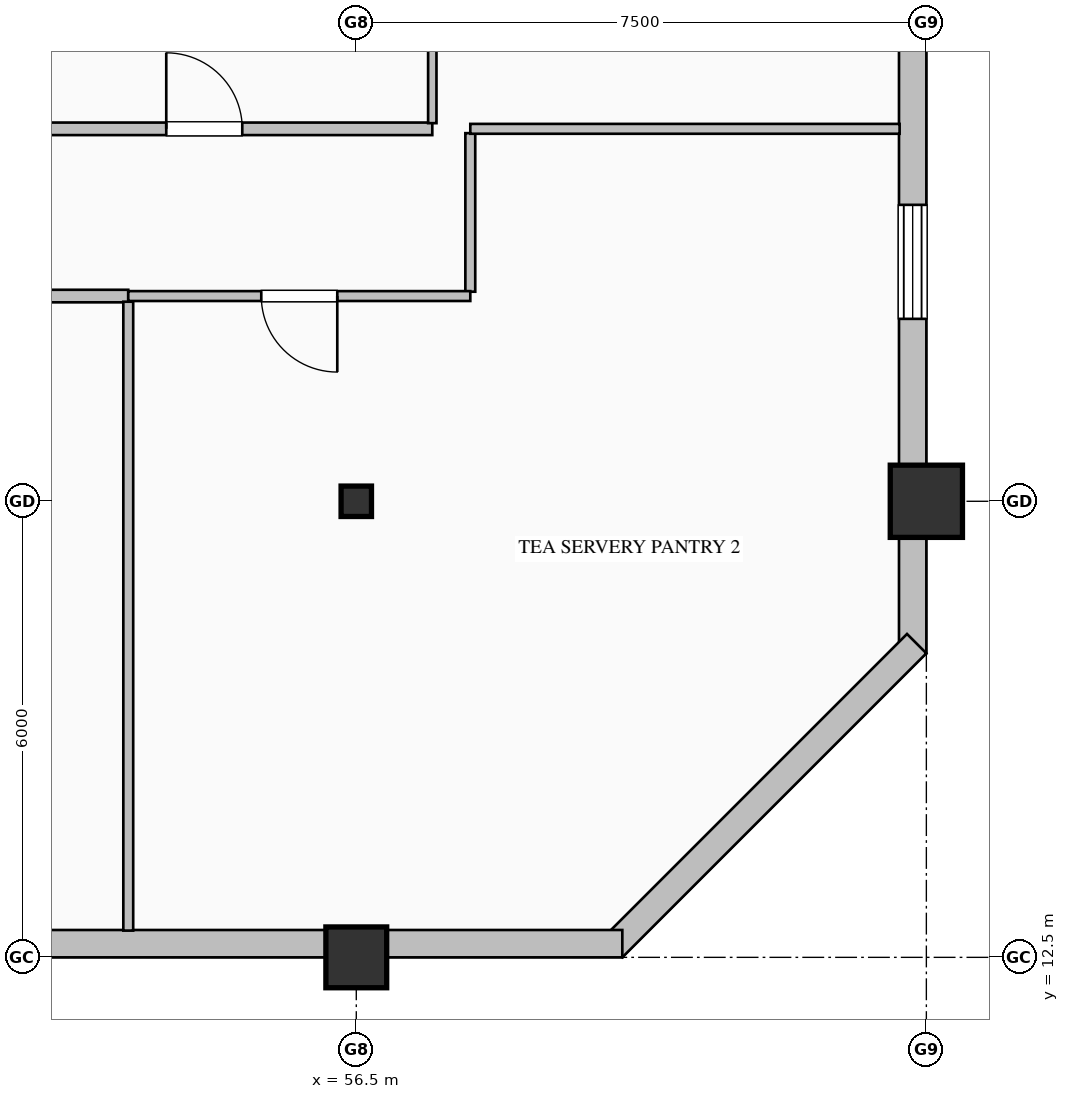
"""IFC4 building model, lengths in metres.
Left out: names, types, materials, properties, quantities, classifications, styles, units other than length and angle.
Written with IfcOpenShell. Run it as: python <this file> out.ifc"""

import sys

from ifc_helpers import new_model, si_unit, direction, frame, frame_2d, origin, origin_2d, place, context, subcontext, project, spatial, rectangle, hollow_rectangle, i_section, extrude, element, fill, save


model = new_model("IFC4")
c1 = context("Model", 3, precision=1e-05, world=origin(), true_north=direction((0.0, 1.0)))
c2 = subcontext(c1, "Body", "Model", "MODEL_VIEW")
j1 = project(units=[si_unit("LENGTHUNIT", "METRE"), si_unit("PLANEANGLEUNIT", "RADIAN")], contexts=[c1])
p1 = place(None, origin())
s1 = spatial("IfcSite", under=j1, at=p1, CompositionType="ELEMENT")
p2 = place(p1, origin())
s2 = spatial("IfcBuilding", under=s1, at=p2, CompositionType="ELEMENT")
p3 = place(p2, frame((0.0, 0.0, 245.8)))
s3 = spatial("IfcBuildingStorey", under=s2, at=p3, CompositionType="ELEMENT", Elevation=245.8)
p4 = place(p3, frame((56.5, 12.5, 0.0), z_axis=(0.0, 0.0, 1.0), x_axis=(1.0, 0.0, 0.0)))
e1 = element("IfcColumn", 1, at=p4, inside=s3, PredefinedType="COLUMN", context=c2, shape_type="SweptSolid", body=[
    extrude(hollow_rectangle(XDim=0.8, YDim=0.8, WallThickness=0.032, at=origin_2d()), origin(), (0.0, 0.0, 1.0), 4.0),
])
p5 = place(p3, frame((56.5, 18.5, 0.0), z_axis=(0.0, 0.0, 1.0), x_axis=(1.0, 0.0, 0.0)))
e2 = element("IfcColumn", 2, at=p5, inside=s3, PredefinedType="COLUMN", context=c2, shape_type="SweptSolid", body=[
    extrude(i_section(OverallWidth=0.4, OverallDepth=0.4, WebThickness=0.013, FlangeThickness=0.021, FilletRadius=0.022, at=origin_2d()), origin(), (0.0, 0.0, 1.0), 4.0),
])
p6 = place(p3, frame((64.0, 18.5, 0.0), z_axis=(0.0, 0.0, 1.0), x_axis=(1.0, 0.0, 0.0)))
e3 = element("IfcColumn", 3, at=p6, inside=s3, PredefinedType="COLUMN", context=c2, shape_type="SweptSolid", body=[
    extrude(hollow_rectangle(XDim=0.95, YDim=0.95, WallThickness=0.036, at=origin_2d()), origin(), (0.0, 0.0, 1.0), 4.0),
])
p7 = place(p3, frame((63.82, 36.05, 0.0), z_axis=(0.0, 0.0, 1.0), x_axis=(0.0, -1.0, 0.0)))
e4 = element("IfcWall", 4, at=p7, inside=s3, PredefinedType="SOLIDWALL", context=c2, shape_type="SweptSolid", body=[
    extrude(rectangle(XDim=19.55, YDim=0.36, at=frame_2d((9.775, 0.0))), origin(), (0.0, 0.0, 1.0), 3.325),
])
p8 = place(p7, frame((2.85, 0.0, 0.7)))
e5 = element("IfcOpeningElement", 5, at=p8, cuts=e4, PredefinedType="OPENING", context=c2, shape_type="SweptSolid", body=[
    extrude(rectangle(XDim=1.5, YDim=2.4, at=frame_2d((0.75, 1.2))), frame((0.0, 0.19, 0.0), z_axis=(0.0, -1.0, 0.0), x_axis=(1.0, 0.0, 0.0)), (0.0, 0.0, 1.0), 0.38),
])
p9 = place(p7, frame((10.125, 0.0, 0.9)))
e6 = element("IfcOpeningElement", 6, at=p9, cuts=e4, PredefinedType="OPENING", context=c2, shape_type="SweptSolid", body=[
    extrude(rectangle(XDim=1.35, YDim=1.85, at=frame_2d((0.675, 0.925))), frame((0.0, 0.19, 0.0), z_axis=(0.0, -1.0, 0.0), x_axis=(1.0, 0.0, 0.0)), (0.0, 0.0, 1.0), 0.38),
])
p10 = place(p7, frame((13.65, 0.0, 0.7)))
e7 = element("IfcOpeningElement", 7, at=p10, cuts=e4, PredefinedType="OPENING", context=c2, shape_type="SweptSolid", body=[
    extrude(rectangle(XDim=1.5, YDim=2.4, at=frame_2d((0.75, 1.2))), frame((0.0, 0.19, 0.0), z_axis=(0.0, -1.0, 0.0), x_axis=(1.0, 0.0, 0.0)), (0.0, 0.0, 1.0), 0.38),
])
p11 = place(p3, frame((63.873, 16.627, 0.0), z_axis=(0.0, 0.0, 1.0), x_axis=(-0.707106781187, -0.707106781187, 0.0)))
e8 = element("IfcWall", 8, at=p11, inside=s3, PredefinedType="SOLIDWALL", context=c2, shape_type="SweptSolid", body=[
    extrude(rectangle(XDim=5.657, YDim=0.36, at=frame_2d((2.828, 0.0))), origin(), (0.0, 0.0, 1.0), 3.775),
])
p12 = place(p3, frame((60.0, 12.68, 0.0), z_axis=(0.0, 0.0, 1.0), x_axis=(-1.0, 0.0, 0.0)))
e9 = element("IfcWall", 9, at=p12, inside=s3, PredefinedType="SOLIDWALL", context=c2, shape_type="SweptSolid", body=[
    extrude(rectangle(XDim=15.5, YDim=0.36, at=frame_2d((7.75, 0.0))), origin(), (0.0, 0.0, 1.0), 3.325),
])
p13 = place(p3, frame((51.5, 23.4, 0.0), z_axis=(0.0, 0.0, 1.0), x_axis=(1.0, 0.0, 0.0)))
e10 = element("IfcWall", 10, at=p13, inside=s3, PredefinedType="PARTITIONING", context=c2, shape_type="SweptSolid", body=[
    extrude(rectangle(XDim=6.0, YDim=0.165, at=frame_2d((3.0, 0.0))), origin(), (0.0, 0.0, 1.0), 3.467),
])
p14 = place(p13, frame((2.5, 0.0, 0.0)))
e11 = element("IfcOpeningElement", 11, at=p14, cuts=e10, PredefinedType="OPENING", context=c2, shape_type="SweptSolid", body=[
    extrude(rectangle(XDim=1.0, YDim=2.15, at=frame_2d((0.5, 1.075))), frame((0.0, 0.093, 0.0), z_axis=(0.0, -1.0, 0.0), x_axis=(1.0, 0.0, 0.0)), (0.0, 0.0, 1.0), 0.185),
])
p15 = place(p3, frame((53.5, 21.2, 0.0), z_axis=(0.0, 0.0, 1.0), x_axis=(-1.0, 0.0, 0.0)))
e12 = element("IfcWall", 12, at=p15, inside=s3, PredefinedType="PARTITIONING", context=c2, shape_type="SweptSolid", body=[
    extrude(rectangle(XDim=8.3, YDim=0.165, at=frame_2d((4.15, 0.0))), origin(), (0.0, 0.0, 1.0), 3.775),
])
p16 = place(p3, frame((58.0, 23.343, 0.0), z_axis=(0.0, 0.0, 1.0), x_axis=(0.0, -1.0, 0.0)))
e13 = element("IfcWall", 13, at=p16, inside=s3, PredefinedType="PARTITIONING", context=c2, shape_type="SweptSolid", body=[
    extrude(rectangle(XDim=2.086, YDim=0.13, at=frame_2d((1.043, 0.0))), origin(), (0.0, 0.0, 1.0), 3.775),
])
p17 = place(p3, frame((58.0, 21.2, 0.0), z_axis=(0.0, 0.0, 1.0), x_axis=(-1.0, 0.0, 0.0)))
e14 = element("IfcWall", 14, at=p17, inside=s3, PredefinedType="PARTITIONING", context=c2, shape_type="SweptSolid", body=[
    extrude(rectangle(XDim=4.5, YDim=0.13, at=frame_2d((2.25, 0.0))), origin(), (0.0, 0.0, 1.0), 3.775),
])
p18 = place(p17, frame((1.75, 0.0, 0.0)))
e15 = element("IfcOpeningElement", 15, at=p18, cuts=e14, PredefinedType="OPENING", context=c2, shape_type="SweptSolid", body=[
    extrude(rectangle(XDim=1.0, YDim=2.15, at=frame_2d((0.5, 1.075))), frame((0.0, 0.075, 0.0), z_axis=(0.0, -1.0, 0.0), x_axis=(1.0, 0.0, 0.0)), (0.0, 0.0, 1.0), 0.15),
])
p19 = place(p3, frame((57.5, 36.0, 0.0), z_axis=(0.0, 0.0, 1.0), x_axis=(0.0, -1.0, 0.0)))
e16 = element("IfcWall", 16, at=p19, inside=s3, PredefinedType="MOVABLE", context=c2, shape_type="SweptSolid", body=[
    extrude(rectangle(XDim=12.525, YDim=0.11, at=frame_2d((6.263, 0.0))), origin(), (0.0, 0.0, 1.0), 3.775),
])
p20 = place(p19, frame((5.763, 0.0, 0.0)))
e17 = element("IfcOpeningElement", 17, at=p20, cuts=e16, PredefinedType="OPENING", context=c2, shape_type="SweptSolid", body=[
    extrude(rectangle(XDim=1.0, YDim=2.15, at=frame_2d((0.5, 1.075))), frame((0.0, 0.065, 0.0), z_axis=(0.0, -1.0, 0.0), x_axis=(1.0, 0.0, 0.0)), (0.0, 0.0, 1.0), 0.13),
])
p21 = place(p3, frame((63.648, 23.4, 0.0), z_axis=(0.0, 0.0, 1.0), x_axis=(-1.0, 0.0, 0.0)))
e18 = element("IfcWall", 18, at=p21, inside=s3, PredefinedType="PARTITIONING", context=c2, shape_type="SweptSolid", body=[
    extrude(rectangle(XDim=5.648, YDim=0.13, at=frame_2d((2.824, 0.0))), origin(), (0.0, 0.0, 1.0), 3.775),
])
p22 = place(p3, frame((53.5, 21.125, 0.0), z_axis=(0.0, 0.0, 1.0), x_axis=(0.0, -1.0, 0.0)))
e19 = element("IfcWall", 19, at=p22, inside=s3, PredefinedType="PARTITIONING", context=c2, shape_type="SweptSolid", body=[
    extrude(rectangle(XDim=8.273, YDim=0.13, at=frame_2d((4.137, 0.0))), origin(), (0.0, 0.0, 1.0), 3.775),
])
p23 = place(p10, origin())
e20 = element("IfcWindow", 20, at=p23, inside=s3, PartitioningType="DOUBLE_PANEL_HORIZONTAL", PredefinedType="WINDOW", context=c2, shape_type="SweptSolid", body=[
    extrude(rectangle(XDim=1.5, YDim=2.4, at=frame_2d((0.75, 1.2))), frame((0.0, 0.15, 0.0), z_axis=(0.0, -1.0, 0.0), x_axis=(1.0, 0.0, 0.0)), (0.0, 0.0, 1.0), 0.06),
])
fill(e7, e20)
p24 = place(p14, origin())
e21 = element("IfcDoor", 21, at=p24, inside=s3, OperationType="SINGLE_SWING_LEFT", PredefinedType="DOOR", context=c2, shape_type="SweptSolid", body=[
    extrude(rectangle(XDim=1.0, YDim=2.15, at=frame_2d((0.5, 1.075))), frame((0.0, 0.025, 0.0), z_axis=(0.0, -1.0, 0.0), x_axis=(1.0, 0.0, 0.0)), (0.0, 0.0, 1.0), 0.05),
])
fill(e11, e21)
p25 = place(p18, origin())
e22 = element("IfcDoor", 22, at=p25, inside=s3, OperationType="SINGLE_SWING_LEFT", PredefinedType="DOOR", context=c2, shape_type="SweptSolid", body=[
    extrude(rectangle(XDim=1.0, YDim=2.15, at=frame_2d((0.5, 1.075))), frame((0.0, 0.025, 0.0), z_axis=(0.0, -1.0, 0.0), x_axis=(1.0, 0.0, 0.0)), (0.0, 0.0, 1.0), 0.05),
])
fill(e15, e22)
save(model, sys.argv[1])
